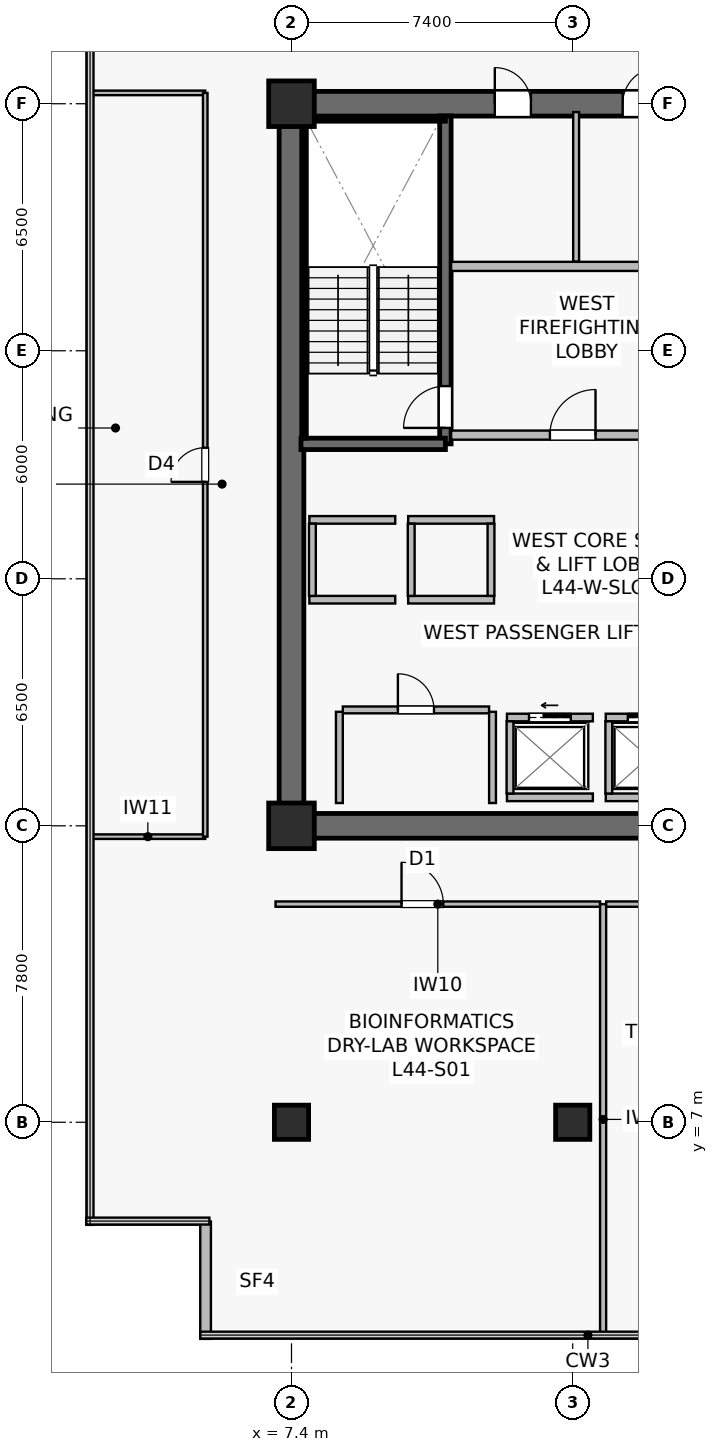
"""IFC4 building model, lengths in metres.
Left out: names, types, materials, properties, quantities, classifications, styles, units other than length and angle.
Written with IfcOpenShell. Run it as: python <this file> out.ifc"""

import sys

from ifc_helpers import new_model, si_unit, direction, frame, frame_2d, origin, origin_2d, place, context, subcontext, project, spatial, rectangle, extrude, source, transform, mapped, element, fill, save


model = new_model("IFC4")
c1 = context("Model", 3, precision=1e-05, world=origin(), true_north=direction((0.0, 1.0)))
c2 = subcontext(c1, "Body", "Model", "MODEL_VIEW")
j1 = project(units=[si_unit("LENGTHUNIT", "METRE"), si_unit("PLANEANGLEUNIT", "RADIAN")], contexts=[c1])
p1 = place(None, origin())
s1 = spatial("IfcSite", under=j1, at=p1, CompositionType="ELEMENT")
p2 = place(p1, origin())
s2 = spatial("IfcBuilding", under=s1, at=p2, CompositionType="ELEMENT")
p3 = place(p2, frame((0.0, 0.0, 183.0)))
s3 = spatial("IfcBuildingStorey", under=s2, at=p3, CompositionType="ELEMENT", Elevation=183.0)
p4 = place(p3, frame((7.075, 14.8, 0.0), z_axis=(0.0, 0.0, 1.0), x_axis=(1.0, 0.0, 0.0)))
e1 = element("IfcWall", 1, at=p4, inside=s3, PredefinedType="SHEAR", context=c2, shape_type="SweptSolid", body=[
    extrude(rectangle(XDim=15.45, YDim=0.65, at=frame_2d((7.725, 0.0))), origin(), (0.0, 0.0, 1.0), 3.79),
])
p5 = place(p3, frame((7.075, 33.8, 0.0), z_axis=(0.0, 0.0, 1.0), x_axis=(1.0, 0.0, 0.0)))
e2 = element("IfcWall", 2, at=p5, inside=s3, PredefinedType="SHEAR", context=c2, shape_type="SweptSolid", body=[
    extrude(rectangle(XDim=15.45, YDim=0.65, at=frame_2d((7.725, 0.0))), origin(), (0.0, 0.0, 1.0), 3.79),
])
p6 = place(p5, frame((5.675, 0.0, 0.0)))
e3 = element("IfcOpeningElement", 3, at=p6, cuts=e2, PredefinedType="OPENING", context=c2, shape_type="SweptSolid", body=[
    extrude(rectangle(XDim=0.95, YDim=2.15, at=frame_2d((0.475, 1.075))), frame((0.0, 0.335, 0.0), z_axis=(0.0, -1.0, 0.0), x_axis=(1.0, 0.0, 0.0)), (0.0, 0.0, 1.0), 0.67),
])
p7 = place(p5, frame((9.04, 0.0, 0.0)))
e4 = element("IfcOpeningElement", 4, at=p7, cuts=e2, PredefinedType="OPENING", context=c2, shape_type="SweptSolid", body=[
    extrude(rectangle(XDim=0.95, YDim=2.15, at=frame_2d((0.475, 1.075))), frame((0.0, 0.335, 0.0), z_axis=(0.0, -1.0, 0.0), x_axis=(1.0, 0.0, 0.0)), (0.0, 0.0, 1.0), 0.67),
])
p8 = place(p5, frame((12.44, 0.0, 0.0)))
e5 = element("IfcOpeningElement", 5, at=p8, cuts=e2, PredefinedType="OPENING", context=c2, shape_type="SweptSolid", body=[
    extrude(rectangle(XDim=0.95, YDim=2.15, at=frame_2d((0.475, 1.075))), frame((0.0, 0.335, 0.0), z_axis=(0.0, -1.0, 0.0), x_axis=(1.0, 0.0, 0.0)), (0.0, 0.0, 1.0), 0.67),
])
p9 = place(p3, frame((7.4, 15.125, 0.0), z_axis=(0.0, 0.0, 1.0), x_axis=(0.0, 1.0, 0.0)))
e6 = element("IfcWall", 6, at=p9, inside=s3, PredefinedType="SHEAR", context=c2, shape_type="SweptSolid", body=[
    extrude(rectangle(XDim=18.35, YDim=0.65, at=frame_2d((9.175, 0.0))), origin(), (0.0, 0.0, 1.0), 3.79),
])
p10 = place(p3, frame((11.45, 24.85, 0.0), z_axis=(0.0, 0.0, 1.0), x_axis=(0.0, 1.0, 0.0)))
e7 = element("IfcWall", 7, at=p10, inside=s3, PredefinedType="SHEAR", context=c2, shape_type="SweptSolid", body=[
    extrude(rectangle(XDim=8.63, YDim=0.3, at=frame_2d((4.315, 0.0))), origin(), (0.0, 0.0, 1.0), 3.79),
])
p11 = place(p10, frame((0.42, 0.0, 0.0)))
e8 = element("IfcOpeningElement", 8, at=p11, cuts=e7, PredefinedType="OPENING", context=c2, shape_type="SweptSolid", body=[
    extrude(rectangle(XDim=1.1, YDim=2.15, at=frame_2d((0.55, 1.075))), frame((0.0, 0.16, 0.0), z_axis=(0.0, -1.0, 0.0), x_axis=(1.0, 0.0, 0.0)), (0.0, 0.0, 1.0), 0.32),
])
p12 = place(p3, frame((7.65, 24.85, 0.0), z_axis=(0.0, 0.0, 1.0), x_axis=(1.0, 0.0, 0.0)))
e9 = element("IfcWall", 9, at=p12, inside=s3, PredefinedType="SHEAR", context=c2, shape_type="SweptSolid", body=[
    extrude(rectangle(XDim=3.8, YDim=0.3, at=frame_2d((1.9, 0.0))), origin(), (0.0, 0.0, 1.0), 3.79),
])
p13 = place(p3, frame((7.73, 33.4, 0.0), z_axis=(0.0, 0.0, 1.0), x_axis=(1.0, 0.0, 0.0)))
e10 = element("IfcWall", 10, at=p13, inside=s3, PredefinedType="SOLIDWALL", context=c2, shape_type="SweptSolid", body=[
    extrude(rectangle(XDim=3.72, YDim=0.12, at=frame_2d((1.86, 0.0))), origin(), (0.0, 0.0, 1.0), 3.79),
])
p14 = place(p3, frame((7.73, 25.0, 0.0), z_axis=(0.0, 0.0, 1.0), x_axis=(0.0, 1.0, 0.0)))
e11 = element("IfcWall", 11, at=p14, inside=s3, PredefinedType="SOLIDWALL", context=c2, shape_type="SweptSolid", body=[
    extrude(rectangle(XDim=8.32, YDim=0.12, at=frame_2d((4.16, 0.0))), origin(), (0.0, 0.0, 1.0), 3.79),
])
m1 = source(origin(), c2, "Body", "SweptSolid", [
    extrude(rectangle(XDim=0.9, YDim=0.9, at=origin_2d()), origin(), (0.0, 0.0, 1.0), 4.1),
])
p15 = place(p3, frame((14.8, 7.0, 0.0), z_axis=(0.0, 0.0, 1.0), x_axis=(1.0, 0.0, 0.0)))
e12 = element("IfcColumn", 12, at=p15, inside=s3, PredefinedType="COLUMN", context=c2, shape_type="MappedRepresentation", body=[
    mapped(m1, transform((0.0, 0.0, 0.0), scale=1.0)),
])
m2 = source(origin(), c2, "Body", "SweptSolid", [
    extrude(rectangle(XDim=1.2, YDim=1.2, at=origin_2d()), origin(), (0.0, 0.0, 1.0), 4.1),
])
for number, where, z_axis, x_axis in (
    (13, (7.4, 14.8, 0.0), (0.0, 0.0, 1.0), (1.0, 0.0, 0.0)),
    (14, (7.4, 33.8, 0.0), (0.0, 0.0, 1.0), (1.0, 0.0, 0.0)),
):
    element("IfcColumn", number, at=place(p3, frame(where, z_axis=z_axis, x_axis=x_axis)), inside=s3, PredefinedType="COLUMN", context=c2, shape_type="MappedRepresentation", body=[
        mapped(m2, transform((0.0, 0.0, 0.0), scale=1.0)),
    ])
p16 = place(p3, frame((7.4, 7.0, 0.0), z_axis=(0.0, 0.0, 1.0), x_axis=(1.0, 0.0, 0.0)))
e15 = element("IfcColumn", 15, at=p16, inside=s3, PredefinedType="COLUMN", context=c2, shape_type="MappedRepresentation", body=[
    mapped(m1, transform((0.0, 0.0, 0.0), scale=1.0)),
])
p17 = place(p3, frame((5.14, 4.388, 0.0), z_axis=(0.0, 0.0, 1.0), x_axis=(0.0, -1.0, 0.0)))
e16 = element("IfcWall", 16, at=p17, inside=s3, PredefinedType="STANDARD", context=c2, shape_type="SweptSolid", body=[
    extrude(rectangle(XDim=3.088, YDim=0.28, at=frame_2d((1.544, 0.0))), origin(), (0.0, 0.0, 1.0), 3.79),
])
p18 = place(p3, frame((11.6, 25.08, 0.0), z_axis=(0.0, 0.0, 1.0), x_axis=(1.0, 0.0, 0.0)))
e17 = element("IfcWall", 17, at=p18, inside=s3, PredefinedType="SOLIDWALL", context=c2, shape_type="SweptSolid", body=[
    extrude(rectangle(XDim=6.92, YDim=0.24, at=frame_2d((3.46, 0.0))), origin(), (0.0, 0.0, 1.0), 3.187),
])
p19 = place(p18, frame((2.6, 0.0, 0.0)))
e18 = element("IfcOpeningElement", 18, at=p19, cuts=e17, PredefinedType="OPENING", context=c2, shape_type="SweptSolid", body=[
    extrude(rectangle(XDim=1.2, YDim=2.16, at=frame_2d((0.6, 1.08))), frame((0.0, 0.13, 0.0), z_axis=(0.0, -1.0, 0.0), x_axis=(1.0, 0.0, 0.0)), (0.0, 0.0, 1.0), 0.26),
])
p20 = place(p3, frame((11.6, 29.52, 0.0), z_axis=(0.0, 0.0, 1.0), x_axis=(1.0, 0.0, 0.0)))
e19 = element("IfcWall", 19, at=p20, inside=s3, PredefinedType="SOLIDWALL", context=c2, shape_type="SweptSolid", body=[
    extrude(rectangle(XDim=6.92, YDim=0.24, at=frame_2d((3.46, 0.0))), origin(), (0.0, 0.0, 1.0), 3.187),
])
p21 = place(p3, frame((13.07, 17.65, 0.0), z_axis=(0.0, 0.0, 1.0), x_axis=(1.0, 0.0, 0.0)))
e20 = element("IfcWall", 20, at=p21, inside=s3, PredefinedType="SOLIDWALL", context=c2, shape_type="SweptSolid", body=[
    extrude(rectangle(XDim=2.26, YDim=0.2, at=frame_2d((1.13, 0.0))), origin(), (0.0, 0.0, 1.0), 3.187),
])
p22 = place(p21, frame((0.58, 0.0, 0.0)))
e21 = element("IfcOpeningElement", 21, at=p22, cuts=e20, PredefinedType="OPENING", context=c2, shape_type="SweptSolid", body=[
    extrude(rectangle(XDim=1.1, YDim=2.22, at=frame_2d((0.55, 1.11))), frame((0.0, 0.11, 0.0), z_axis=(0.0, -1.0, 0.0), x_axis=(1.0, 0.0, 0.0)), (0.0, 0.0, 1.0), 0.22),
])
p23 = place(p3, frame((13.07, 15.55, 0.0), z_axis=(0.0, 0.0, 1.0), x_axis=(1.0, 0.0, 0.0)))
e22 = element("IfcWall", 22, at=p23, inside=s3, PredefinedType="SOLIDWALL", context=c2, shape_type="SweptSolid", body=[
    extrude(rectangle(XDim=2.26, YDim=0.2, at=frame_2d((1.13, 0.0))), origin(), (0.0, 0.0, 1.0), 3.187),
])
p24 = place(p3, frame((13.15, 15.65, 0.0), z_axis=(0.0, 0.0, 1.0), x_axis=(0.0, 1.0, 0.0)))
e23 = element("IfcWall", 23, at=p24, inside=s3, PredefinedType="SOLIDWALL", context=c2, shape_type="SweptSolid", body=[
    extrude(rectangle(XDim=1.9, YDim=0.18, at=frame_2d((0.95, 0.0))), origin(), (0.0, 0.0, 1.0), 3.79),
])
p25 = place(p3, frame((15.67, 17.65, 0.0), z_axis=(0.0, 0.0, 1.0), x_axis=(1.0, 0.0, 0.0)))
e24 = element("IfcWall", 24, at=p25, inside=s3, PredefinedType="SOLIDWALL", context=c2, shape_type="SweptSolid", body=[
    extrude(rectangle(XDim=2.26, YDim=0.2, at=frame_2d((1.13, 0.0))), origin(), (0.0, 0.0, 1.0), 3.79),
])
p26 = place(p25, frame((0.58, 0.0, 0.0)))
e25 = element("IfcOpeningElement", 25, at=p26, cuts=e24, PredefinedType="OPENING", context=c2, shape_type="SweptSolid", body=[
    extrude(rectangle(XDim=1.1, YDim=2.22, at=frame_2d((0.55, 1.11))), frame((0.0, 0.11, 0.0), z_axis=(0.0, -1.0, 0.0), x_axis=(1.0, 0.0, 0.0)), (0.0, 0.0, 1.0), 0.22),
])
p27 = place(p3, frame((15.67, 15.55, 0.0), z_axis=(0.0, 0.0, 1.0), x_axis=(1.0, 0.0, 0.0)))
e26 = element("IfcWall", 26, at=p27, inside=s3, PredefinedType="SOLIDWALL", context=c2, shape_type="SweptSolid", body=[
    extrude(rectangle(XDim=2.26, YDim=0.2, at=frame_2d((1.13, 0.0))), origin(), (0.0, 0.0, 1.0), 3.79),
])
p28 = place(p3, frame((15.75, 15.65, 0.0), z_axis=(0.0, 0.0, 1.0), x_axis=(0.0, 1.0, 0.0)))
e27 = element("IfcWall", 27, at=p28, inside=s3, PredefinedType="SOLIDWALL", context=c2, shape_type="SweptSolid", body=[
    extrude(rectangle(XDim=1.9, YDim=0.18, at=frame_2d((0.95, 0.0))), origin(), (0.0, 0.0, 1.0), 3.79),
])
for number, where, z_axis, x_axis in (
    (28, (7.87, 20.75, 0.0), (0.0, 0.0, 1.0), (1.0, 0.0, 0.0)),
    (29, (7.87, 22.85, 0.0), (0.0, 0.0, 1.0), (1.0, 0.0, 0.0)),
):
    element("IfcWall", number, at=place(p3, frame(where, z_axis=z_axis, x_axis=x_axis)), inside=s3, PredefinedType="SOLIDWALL", context=c2, shape_type="SweptSolid", body=[
        extrude(rectangle(XDim=2.26, YDim=0.2, at=frame_2d((1.13, 0.0))), origin(), (0.0, 0.0, 1.0), 3.79),
    ])
p29 = place(p3, frame((7.95, 20.85, 0.0), z_axis=(0.0, 0.0, 1.0), x_axis=(0.0, 1.0, 0.0)))
e30 = element("IfcWall", 30, at=p29, inside=s3, PredefinedType="SOLIDWALL", context=c2, shape_type="SweptSolid", body=[
    extrude(rectangle(XDim=1.9, YDim=0.18, at=frame_2d((0.95, 0.0))), origin(), (0.0, 0.0, 1.0), 3.79),
])
for number, where, z_axis, x_axis in (
    (31, (10.47, 20.75, 0.0), (0.0, 0.0, 1.0), (1.0, 0.0, 0.0)),
    (32, (10.47, 22.85, 0.0), (0.0, 0.0, 1.0), (1.0, 0.0, 0.0)),
):
    element("IfcWall", number, at=place(p3, frame(where, z_axis=z_axis, x_axis=x_axis)), inside=s3, PredefinedType="SOLIDWALL", context=c2, shape_type="SweptSolid", body=[
        extrude(rectangle(XDim=2.26, YDim=0.2, at=frame_2d((1.13, 0.0))), origin(), (0.0, 0.0, 1.0), 3.79),
    ])
for number, where, z_axis, x_axis in (
    (33, (10.55, 20.85, 0.0), (0.0, 0.0, 1.0), (0.0, 1.0, 0.0)),
    (34, (12.65, 20.85, 0.0), (0.0, 0.0, 1.0), (0.0, 1.0, 0.0)),
):
    element("IfcWall", number, at=place(p3, frame(where, z_axis=z_axis, x_axis=x_axis)), inside=s3, PredefinedType="SOLIDWALL", context=c2, shape_type="SweptSolid", body=[
        extrude(rectangle(XDim=1.9, YDim=0.18, at=frame_2d((0.95, 0.0))), origin(), (0.0, 0.0, 1.0), 3.79),
    ])
p30 = place(p3, frame((8.75, 17.85, 0.0), z_axis=(0.0, 0.0, 1.0), x_axis=(1.0, 0.0, 0.0)))
e35 = element("IfcWall", 35, at=p30, inside=s3, PredefinedType="SOLIDWALL", context=c2, shape_type="SweptSolid", body=[
    extrude(rectangle(XDim=3.85, YDim=0.18, at=frame_2d((1.925, 0.0))), origin(), (0.0, 0.0, 1.0), 3.79),
])
p31 = place(p30, frame((1.45, 0.0, 0.0)))
e36 = element("IfcOpeningElement", 36, at=p31, cuts=e35, PredefinedType="OPENING", context=c2, shape_type="SweptSolid", body=[
    extrude(rectangle(XDim=0.95, YDim=2.15, at=frame_2d((0.475, 1.075))), frame((0.0, 0.1, 0.0), z_axis=(0.0, -1.0, 0.0), x_axis=(1.0, 0.0, 0.0)), (0.0, 0.0, 1.0), 0.2),
])
for number, where, z_axis, x_axis in (
    (37, (12.69, 15.4, 0.0), (0.0, 0.0, 1.0), (0.0, 1.0, 0.0)),
    (38, (8.66, 15.4, 0.0), (0.0, 0.0, 1.0), (0.0, 1.0, 0.0)),
):
    element("IfcWall", number, at=place(p3, frame(where, z_axis=z_axis, x_axis=x_axis)), inside=s3, PredefinedType="SOLIDWALL", context=c2, shape_type="SweptSolid", body=[
        extrude(rectangle(XDim=2.4, YDim=0.18, at=frame_2d((1.2, 0.0))), origin(), (0.0, 0.0, 1.0), 3.79),
    ])
p32 = place(p3, frame((14.89, 29.65, 0.0), z_axis=(0.0, 0.0, 1.0), x_axis=(0.0, 1.0, 0.0)))
e39 = element("IfcWall", 39, at=p32, inside=s3, PredefinedType="PLUMBINGWALL", context=c2, shape_type="SweptSolid", body=[
    extrude(rectangle(XDim=3.93, YDim=0.155, at=frame_2d((1.965, 0.0))), origin(), (0.0, 0.0, 1.0), 3.187),
])
p33 = place(p3, frame((6.98, 12.74, 0.0), z_axis=(0.0, 0.0, 1.0), x_axis=(1.0, 0.0, 0.0)))
e40 = element("IfcWall", 40, at=p33, inside=s3, PredefinedType="PARTITIONING", context=c2, shape_type="SweptSolid", body=[
    extrude(rectangle(XDim=8.54, YDim=0.14, at=frame_2d((4.27, 0.0))), origin(), (0.0, 0.0, 1.0), 3.187),
])
p34 = place(p33, frame((3.316, 0.0, 0.0)))
e41 = element("IfcOpeningElement", 41, at=p34, cuts=e40, PredefinedType="OPENING", context=c2, shape_type="SweptSolid", body=[
    extrude(rectangle(XDim=1.1, YDim=2.18, at=frame_2d((0.55, 1.09))), frame((0.0, 0.08, 0.0), z_axis=(0.0, -1.0, 0.0), x_axis=(1.0, 0.0, 0.0)), (0.0, 0.0, 1.0), 0.16),
])
p35 = place(p3, frame((15.6, 1.41, 0.0), z_axis=(0.0, 0.0, 1.0), x_axis=(0.0, 1.0, 0.0)))
e42 = element("IfcWall", 42, at=p35, inside=s3, PredefinedType="PARTITIONING", context=c2, shape_type="SweptSolid", body=[
    extrude(rectangle(XDim=11.33, YDim=0.16, at=frame_2d((5.665, 0.0))), origin(), (0.0, 0.0, 1.0), 3.075),
])
p36 = place(p3, frame((15.68, 12.74, 0.0), z_axis=(0.0, 0.0, 1.0), x_axis=(1.0, 0.0, 0.0)))
e43 = element("IfcWall", 43, at=p36, inside=s3, PredefinedType="PARTITIONING", context=c2, shape_type="SweptSolid", body=[
    extrude(rectangle(XDim=11.64, YDim=0.14, at=frame_2d((5.82, 0.0))), origin(), (0.0, 0.0, 1.0), 3.187),
])
p37 = place(p36, frame((5.86, 0.0, 0.0)))
e44 = element("IfcOpeningElement", 44, at=p37, cuts=e43, PredefinedType="OPENING", context=c2, shape_type="SweptSolid", body=[
    extrude(rectangle(XDim=1.1, YDim=2.18, at=frame_2d((0.55, 1.09))), frame((0.0, 0.08, 0.0), z_axis=(0.0, -1.0, 0.0), x_axis=(1.0, 0.0, 0.0)), (0.0, 0.0, 1.0), 0.16),
])
for number, where, z_axis, x_axis in (
    (45, (2.11, 14.515, 0.0), (0.0, 0.0, 1.0), (1.0, 0.0, 0.0)),
    (46, (2.11, 34.085, 0.0), (0.0, 0.0, 1.0), (1.0, 0.0, 0.0)),
):
    element("IfcWall", number, at=place(p3, frame(where, z_axis=z_axis, x_axis=x_axis)), inside=s3, PredefinedType="PARTITIONING", context=c2, shape_type="SweptSolid", body=[
        extrude(rectangle(XDim=3.02, YDim=0.12, at=frame_2d((1.51, 0.0))), origin(), (0.0, 0.0, 1.0), 3.79),
    ])
p38 = place(p3, frame((5.13, 14.515, 0.0), z_axis=(0.0, 0.0, 1.0), x_axis=(0.0, 1.0, 0.0)))
e47 = element("IfcWall", 47, at=p38, inside=s3, PredefinedType="PARTITIONING", context=c2, shape_type="SweptSolid", body=[
    extrude(rectangle(XDim=19.57, YDim=0.12, at=frame_2d((9.785, 0.0))), origin(), (0.0, 0.0, 1.0), 3.79),
])
p39 = place(p38, frame((9.335, 0.0, 0.0)))
e48 = element("IfcOpeningElement", 48, at=p39, cuts=e47, PredefinedType="OPENING", context=c2, shape_type="SweptSolid", body=[
    extrude(rectangle(XDim=0.9, YDim=2.1, at=frame_2d((0.45, 1.05))), frame((0.0, 0.07, 0.0), z_axis=(0.0, -1.0, 0.0), x_axis=(1.0, 0.0, 0.0)), (0.0, 0.0, 1.0), 0.14),
])
m3 = source(origin(), c2, "Body", "SweptSolid", [
    extrude(rectangle(XDim=1.1, YDim=2.15, at=frame_2d((0.55, 1.075))), frame((0.0, 0.025, 0.0), z_axis=(0.0, -1.0, 0.0), x_axis=(1.0, 0.0, 0.0)), (0.0, 0.0, 1.0), 0.05),
])
p40 = place(p11, origin())
e49 = element("IfcDoor", 49, at=p40, inside=s3, OperationType="SINGLE_SWING_LEFT", PredefinedType="DOOR", context=c2, shape_type="MappedRepresentation", body=[
    mapped(m3, transform((0.0, 0.0, 0.0), scale=1.0)),
])
fill(e8, e49)
m4 = source(origin(), c2, "Body", "SweptSolid", [
    extrude(rectangle(XDim=1.2, YDim=2.16, at=frame_2d((0.6, 1.08))), frame((0.0, 0.025, 0.0), z_axis=(0.0, -1.0, 0.0), x_axis=(1.0, 0.0, 0.0)), (0.0, 0.0, 1.0), 0.05),
])
p41 = place(p19, origin())
e50 = element("IfcDoor", 50, at=p41, inside=s3, OperationType="SINGLE_SWING_RIGHT", PredefinedType="DOOR", context=c2, shape_type="MappedRepresentation", body=[
    mapped(m4, transform((0.0, 0.0, 0.0), scale=1.0)),
])
fill(e18, e50)
m5 = source(origin(), c2, "Body", "SweptSolid", [
    extrude(rectangle(XDim=1.1, YDim=2.22, at=frame_2d((0.55, 1.11))), frame((0.0, 0.025, 0.0), z_axis=(0.0, -1.0, 0.0), x_axis=(1.0, 0.0, 0.0)), (0.0, 0.0, 1.0), 0.05),
])
p42 = place(p22, origin())
e51 = element("IfcDoor", 51, at=p42, inside=s3, OperationType="SLIDING_TO_LEFT", PredefinedType="USERDEFINED", context=c2, shape_type="MappedRepresentation", body=[
    mapped(m5, transform((0.0, 0.0, 0.0), scale=1.0)),
])
fill(e21, e51)
p43 = place(p26, origin())
e52 = element("IfcDoor", 52, at=p43, inside=s3, OperationType="SLIDING_TO_RIGHT", PredefinedType="USERDEFINED", context=c2, shape_type="MappedRepresentation", body=[
    mapped(m5, transform((0.0, 0.0, 0.0), scale=1.0)),
])
fill(e25, e52)
m6 = source(origin(), c2, "Body", "SweptSolid", [
    extrude(rectangle(XDim=0.95, YDim=2.15, at=frame_2d((0.475, 1.075))), frame((0.0, 0.025, 0.0), z_axis=(0.0, -1.0, 0.0), x_axis=(1.0, 0.0, 0.0)), (0.0, 0.0, 1.0), 0.05),
])
p44 = place(p31, origin())
e53 = element("IfcDoor", 53, at=p44, inside=s3, OperationType="SINGLE_SWING_LEFT", PredefinedType="DOOR", context=c2, shape_type="MappedRepresentation", body=[
    mapped(m6, transform((0.0, 0.0, 0.0), scale=1.0)),
])
fill(e36, e53)
p45 = place(p6, origin())
e54 = element("IfcDoor", 54, at=p45, inside=s3, OperationType="SINGLE_SWING_LEFT", PredefinedType="DOOR", context=c2, shape_type="MappedRepresentation", body=[
    mapped(m6, transform((0.0, 0.0, 0.0), scale=1.0)),
])
fill(e3, e54)
p46 = place(p7, origin())
e55 = element("IfcDoor", 55, at=p46, inside=s3, OperationType="SINGLE_SWING_RIGHT", PredefinedType="DOOR", context=c2, shape_type="MappedRepresentation", body=[
    mapped(m6, transform((0.0, 0.0, 0.0), scale=1.0)),
])
fill(e4, e55)
m7 = source(origin(), c2, "Body", "SweptSolid", [
    extrude(rectangle(XDim=1.1, YDim=2.18, at=frame_2d((0.55, 1.09))), frame((0.0, 0.025, 0.0), z_axis=(0.0, -1.0, 0.0), x_axis=(1.0, 0.0, 0.0)), (0.0, 0.0, 1.0), 0.05),
])
p47 = place(p34, origin())
e56 = element("IfcDoor", 56, at=p47, inside=s3, OperationType="SINGLE_SWING_LEFT", PredefinedType="DOOR", context=c2, shape_type="MappedRepresentation", body=[
    mapped(m7, transform((0.0, 0.0, 0.0), scale=1.0)),
])
fill(e41, e56)
m8 = source(origin(), c2, "Body", "SweptSolid", [
    extrude(rectangle(XDim=0.9, YDim=2.1, at=frame_2d((0.45, 1.05))), frame((0.0, 0.025, 0.0), z_axis=(0.0, -1.0, 0.0), x_axis=(1.0, 0.0, 0.0)), (0.0, 0.0, 1.0), 0.05),
])
p48 = place(p39, origin())
e57 = element("IfcDoor", 57, at=p48, inside=s3, OperationType="SINGLE_SWING_LEFT", PredefinedType="DOOR", context=c2, shape_type="MappedRepresentation", body=[
    mapped(m8, transform((0.0, 0.0, 0.0), scale=1.0)),
])
fill(e48, e57)
save(model, sys.argv[1])
